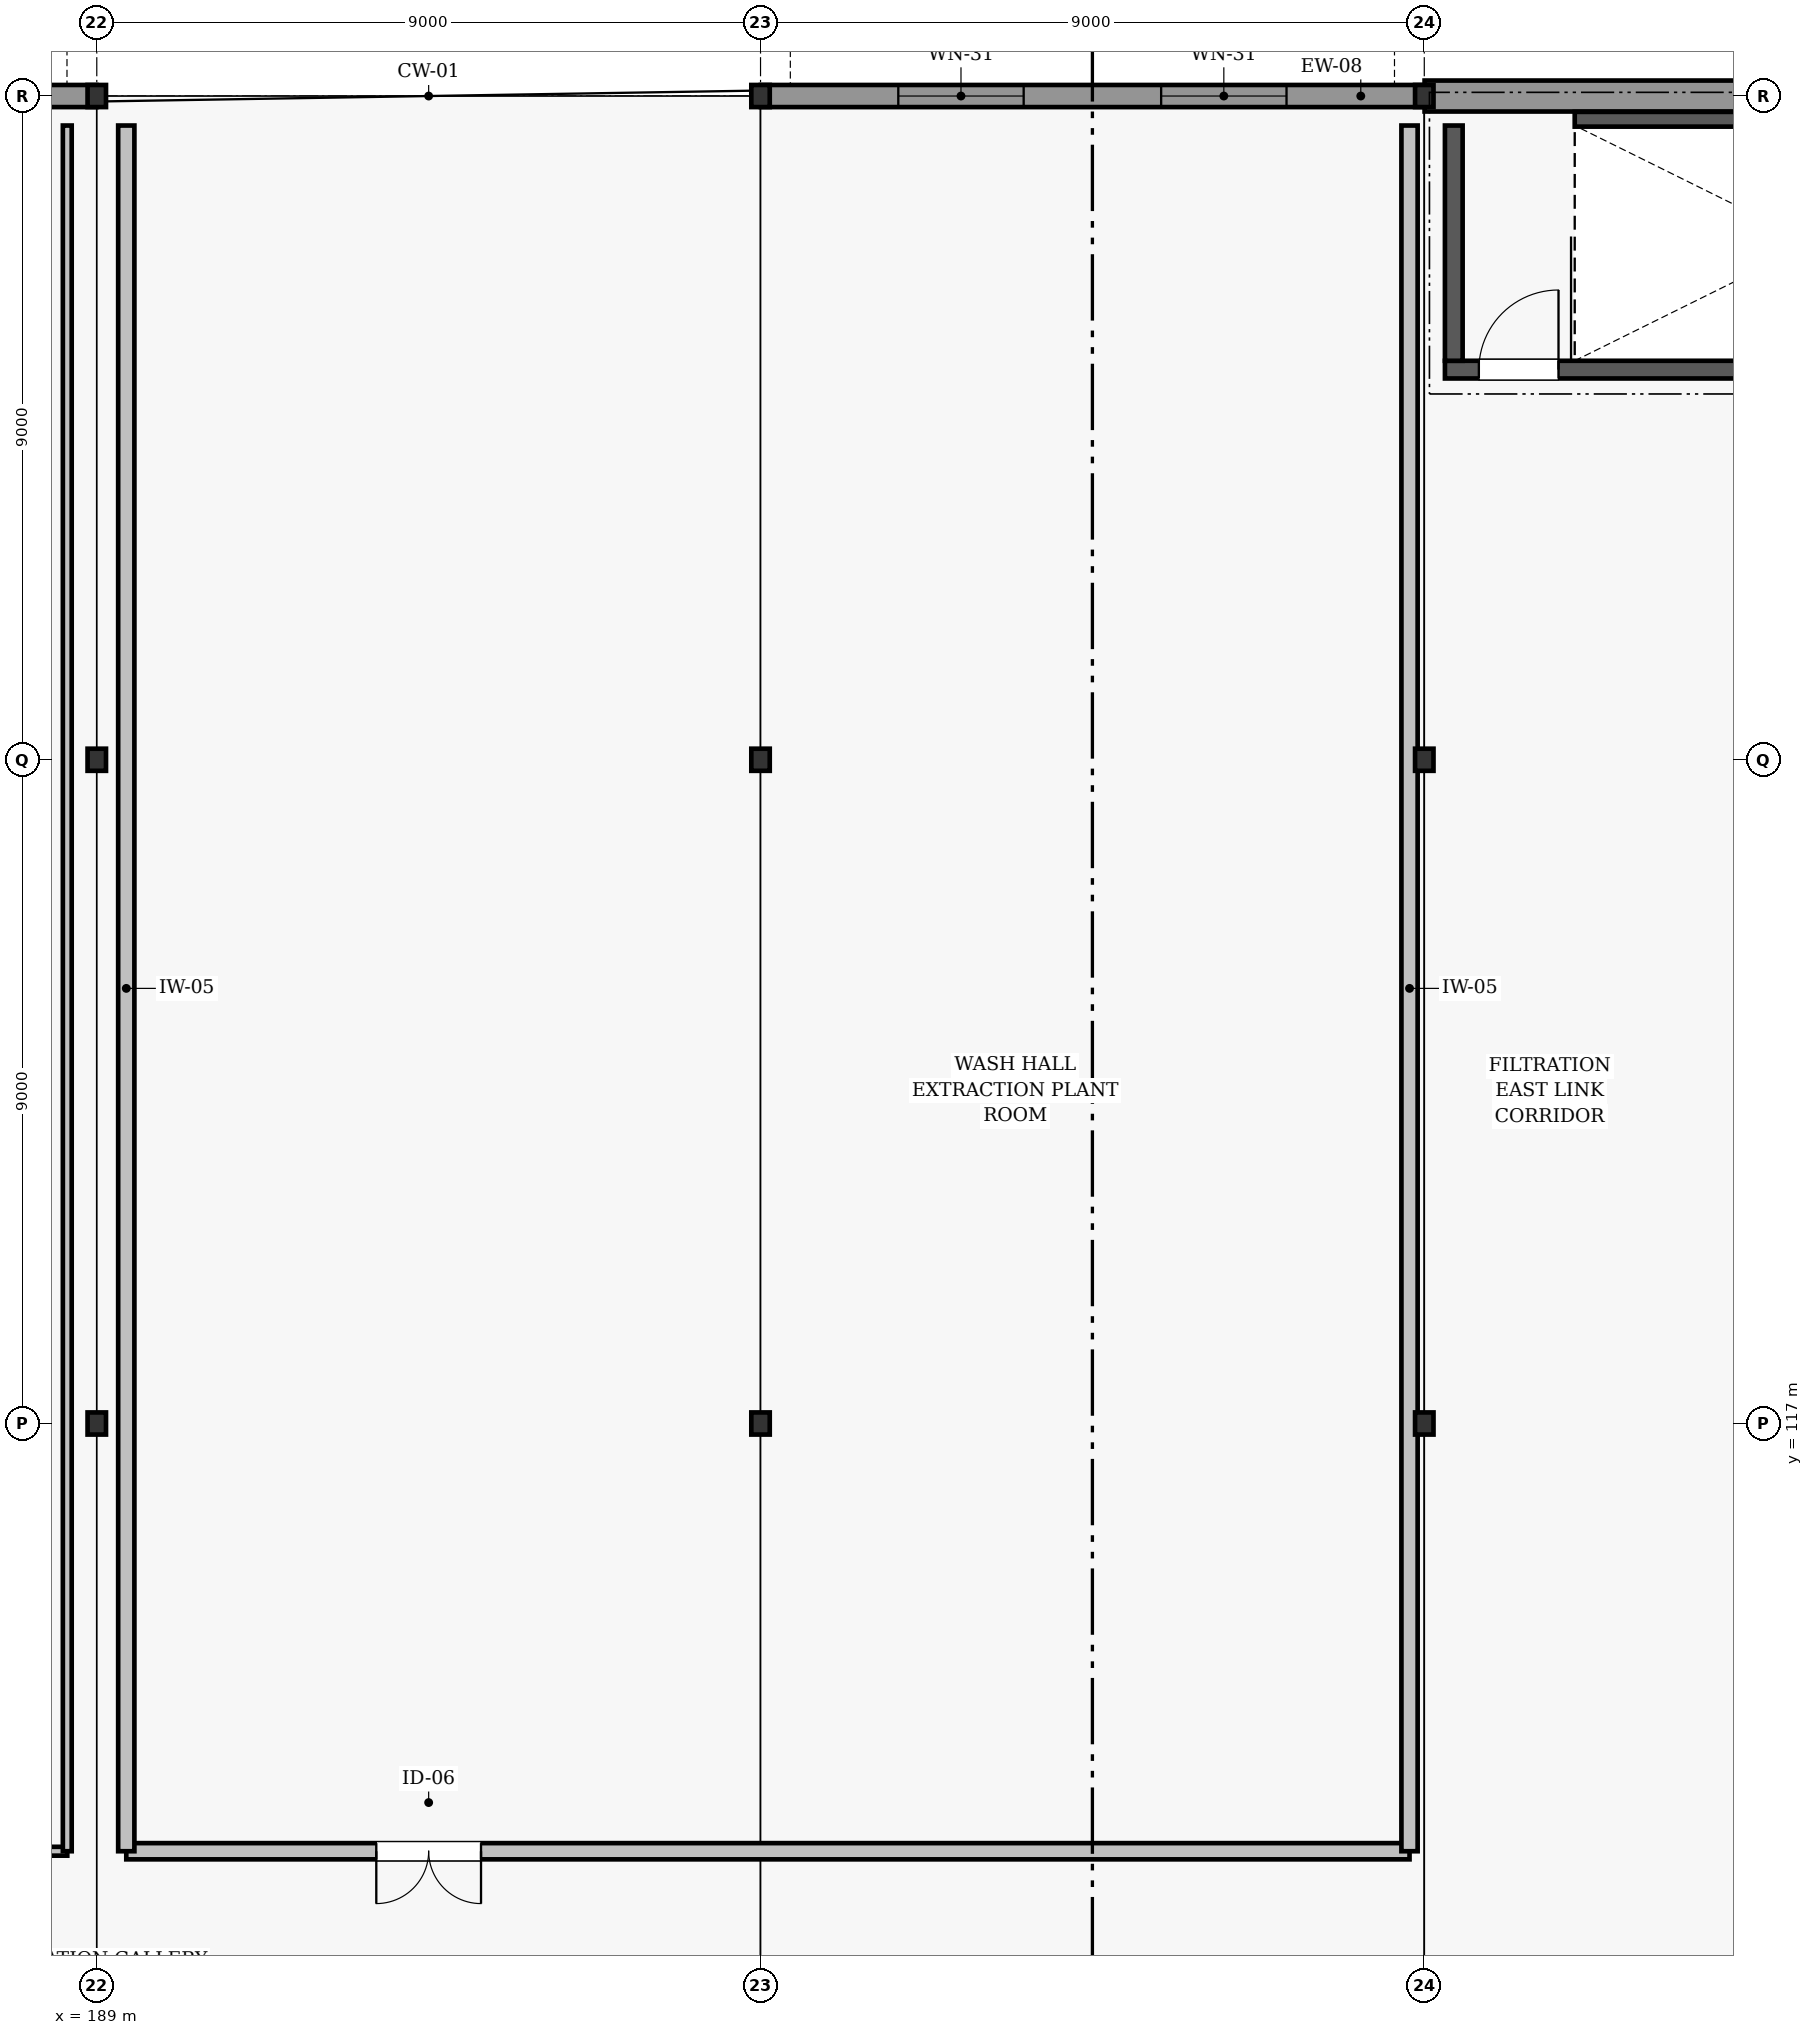
"""IFC4 building model, lengths in metres.
Left out: names, types, materials, properties, quantities, classifications, styles, units other than length and angle.
Written with IfcOpenShell. Run it as: python <this file> out.ifc"""

import sys

from ifc_helpers import new_model, si_unit, direction, frame, frame_2d, origin, origin_2d, place, context, subcontext, project, spatial, rectangle, i_section, extrude, element, fill, save


model = new_model("IFC4")
c1 = context("Model", 3, precision=1e-05, world=origin(), true_north=direction((0.0, 1.0)))
c2 = subcontext(c1, "Body", "Model", "MODEL_VIEW")
j1 = project(units=[si_unit("LENGTHUNIT", "METRE"), si_unit("PLANEANGLEUNIT", "RADIAN")], contexts=[c1])
p1 = place(None, origin())
s1 = spatial("IfcSite", under=j1, at=p1, CompositionType="ELEMENT")
p2 = place(p1, origin())
s2 = spatial("IfcBuilding", under=s1, at=p2, CompositionType="ELEMENT")
p3 = place(p2, frame((0.0, 0.0, 4.8)))
s3 = spatial("IfcBuildingStorey", under=s2, at=p3, CompositionType="ELEMENT", Elevation=4.8)
for number, where, z_axis, x_axis in (
    (1, (189.0, 117.0, 0.0), (0.0, 0.0, 1.0), (1.0, 0.0, 0.0)),
    (2, (189.0, 126.0, 0.0), (0.0, 0.0, 1.0), (1.0, 0.0, 0.0)),
    (3, (189.0, 135.0, 0.0), (0.0, 0.0, 1.0), (1.0, 0.0, 0.0)),
    (4, (198.0, 117.0, 0.0), (0.0, 0.0, 1.0), (1.0, 0.0, 0.0)),
    (5, (198.0, 126.0, 0.0), (0.0, 0.0, 1.0), (1.0, 0.0, 0.0)),
    (6, (198.0, 135.0, 0.0), (0.0, 0.0, 1.0), (1.0, 0.0, 0.0)),
    (7, (207.0, 117.0, 0.0), (0.0, 0.0, 1.0), (1.0, 0.0, 0.0)),
    (8, (207.0, 126.0, 0.0), (0.0, 0.0, 1.0), (1.0, 0.0, 0.0)),
    (9, (207.0, 135.0, 0.0), (0.0, 0.0, 1.0), (1.0, 0.0, 0.0)),
):
    element("IfcColumn", number, at=place(p3, frame(where, z_axis=z_axis, x_axis=x_axis)), inside=s3, PredefinedType="COLUMN", context=c2, shape_type="SweptSolid", body=[
        extrude(i_section(OverallWidth=0.25, OverallDepth=0.3, WebThickness=0.01, FlangeThickness=0.01, FilletRadius=0.012, at=origin_2d()), origin(), (0.0, 0.0, 1.0), 3.6),
    ])
p4 = place(p3, frame((180.004, 135.0, 0.0), z_axis=(0.0, 0.0, 1.0), x_axis=(1.0, 0.0, 0.0)))
e10 = element("IfcWall", 10, at=p4, inside=s3, PredefinedType="SOLIDWALL", context=c2, shape_type="SweptSolid", body=[
    extrude(rectangle(XDim=8.992, YDim=0.3, at=frame_2d((4.496, 0.0))), origin(), (0.0, 0.0, 1.0), 2.842),
])
p5 = place(p4, frame((1.764, 0.0, 1.55)))
e11 = element("IfcOpeningElement", 11, at=p5, cuts=e10, PredefinedType="OPENING", context=c2, shape_type="SweptSolid", body=[
    extrude(rectangle(XDim=1.85, YDim=1.04, at=frame_2d((0.925, 0.52))), frame((0.0, 0.16, 0.0), z_axis=(0.0, -1.0, 0.0), x_axis=(1.0, 0.0, 0.0)), (0.0, 0.0, 1.0), 0.32),
])
p6 = place(p4, frame((5.378, 0.0, 1.55)))
e12 = element("IfcOpeningElement", 12, at=p6, cuts=e10, PredefinedType="OPENING", context=c2, shape_type="SweptSolid", body=[
    extrude(rectangle(XDim=1.85, YDim=1.04, at=frame_2d((0.925, 0.52))), frame((0.0, 0.16, 0.0), z_axis=(0.0, -1.0, 0.0), x_axis=(1.0, 0.0, 0.0)), (0.0, 0.0, 1.0), 0.32),
])
p7 = place(p3, frame((198.004, 135.0, 0.0), z_axis=(0.0, 0.0, 1.0), x_axis=(1.0, 0.0, 0.0)))
e13 = element("IfcWall", 13, at=p7, inside=s3, PredefinedType="SOLIDWALL", context=c2, shape_type="SweptSolid", body=[
    extrude(rectangle(XDim=8.992, YDim=0.3, at=frame_2d((4.496, 0.0))), origin(), (0.0, 0.0, 1.0), 2.842),
])
p8 = place(p7, frame((1.864, 0.0, 1.55)))
e14 = element("IfcOpeningElement", 14, at=p8, cuts=e13, PredefinedType="OPENING", context=c2, shape_type="SweptSolid", body=[
    extrude(rectangle(XDim=1.7, YDim=1.0, at=frame_2d((0.85, 0.5))), frame((0.0, 0.16, 0.0), z_axis=(0.0, -1.0, 0.0), x_axis=(1.0, 0.0, 0.0)), (0.0, 0.0, 1.0), 0.32),
])
p9 = place(p7, frame((5.428, 0.0, 1.55)))
e15 = element("IfcOpeningElement", 15, at=p9, cuts=e13, PredefinedType="OPENING", context=c2, shape_type="SweptSolid", body=[
    extrude(rectangle(XDim=1.7, YDim=1.0, at=frame_2d((0.85, 0.5))), frame((0.0, 0.16, 0.0), z_axis=(0.0, -1.0, 0.0), x_axis=(1.0, 0.0, 0.0)), (0.0, 0.0, 1.0), 0.32),
])
p10 = place(p3, frame((207.004, 135.0, 0.0), z_axis=(0.0, 0.0, 1.0), x_axis=(1.0, 0.0, 0.0)))
e16 = element("IfcWall", 16, at=p10, inside=s3, PredefinedType="SOLIDWALL", context=c2, shape_type="SweptSolid", body=[
    extrude(rectangle(XDim=8.992, YDim=0.42, at=frame_2d((4.496, 0.0))), origin(), (0.0, 0.0, 1.0), 2.842),
])
p11 = place(p3, frame((207.28, 131.29, 0.0), z_axis=(0.0, 0.0, 1.0), x_axis=(1.0, 0.0, 0.0)))
e17 = element("IfcWall", 17, at=p11, inside=s3, PredefinedType="SHEAR", context=c2, shape_type="SweptSolid", body=[
    extrude(rectangle(XDim=8.44, YDim=0.24, at=frame_2d((4.22, 0.0))), origin(), (0.0, 0.0, 1.0), 3.35),
])
p12 = place(p11, frame((0.46, 0.0, 0.0)))
e18 = element("IfcOpeningElement", 18, at=p12, cuts=e17, PredefinedType="OPENING", context=c2, shape_type="SweptSolid", body=[
    extrude(rectangle(XDim=1.08, YDim=2.08, at=frame_2d((0.54, 1.04))), frame((0.0, 0.13, 0.0), z_axis=(0.0, -1.0, 0.0), x_axis=(1.0, 0.0, 0.0)), (0.0, 0.0, 1.0), 0.26),
])
p13 = place(p3, frame((209.04, 134.685, 0.0), z_axis=(0.0, 0.0, 1.0), x_axis=(1.0, 0.0, 0.0)))
e19 = element("IfcWall", 19, at=p13, inside=s3, PredefinedType="SHEAR", context=c2, shape_type="SweptSolid", body=[
    extrude(rectangle(XDim=6.44, YDim=0.2, at=frame_2d((3.22, 0.0))), origin(), (0.0, 0.0, 1.0), 3.35),
])
p14 = place(p3, frame((207.4, 131.41, 0.0), z_axis=(0.0, 0.0, 1.0), x_axis=(0.0, 1.0, 0.0)))
e20 = element("IfcWall", 20, at=p14, inside=s3, PredefinedType="SHEAR", context=c2, shape_type="SweptSolid", body=[
    extrude(rectangle(XDim=3.19, YDim=0.24, at=frame_2d((1.595, 0.0))), origin(), (0.0, 0.0, 1.0), 3.35),
])
p15 = place(p3, frame((162.4, 111.2, 0.0), z_axis=(0.0, 0.0, 1.0), x_axis=(1.0, 0.0, 0.0)))
e21 = element("IfcWall", 21, at=p15, inside=s3, PredefinedType="PARTITIONING", context=c2, shape_type="SweptSolid", body=[
    extrude(rectangle(XDim=26.2, YDim=0.12, at=frame_2d((13.1, 0.0))), origin(), (0.0, 0.0, 1.0), 2.845),
])
p16 = place(p15, frame((12.61, 0.0, 0.0)))
e22 = element("IfcOpeningElement", 22, at=p16, cuts=e21, PredefinedType="OPENING", context=c2, shape_type="SweptSolid", body=[
    extrude(rectangle(XDim=0.98, YDim=2.08, at=frame_2d((0.49, 1.04))), frame((0.0, 0.07, 0.0), z_axis=(0.0, -1.0, 0.0), x_axis=(1.0, 0.0, 0.0)), (0.0, 0.0, 1.0), 0.14),
])
p17 = place(p3, frame((188.6, 111.2, 0.0), z_axis=(0.0, 0.0, 1.0), x_axis=(0.0, 1.0, 0.0)))
e23 = element("IfcWall", 23, at=p17, inside=s3, PredefinedType="PARTITIONING", context=c2, shape_type="SweptSolid", body=[
    extrude(rectangle(XDim=23.4, YDim=0.12, at=frame_2d((11.7, 0.0))), origin(), (0.0, 0.0, 1.0), 2.845),
])
p18 = place(p3, frame((189.4, 111.2, 0.0), z_axis=(0.0, 0.0, 1.0), x_axis=(1.0, 0.0, 0.0)))
e24 = element("IfcWall", 24, at=p18, inside=s3, PredefinedType="SOLIDWALL", context=c2, shape_type="SweptSolid", body=[
    extrude(rectangle(XDim=17.4, YDim=0.22, at=frame_2d((8.7, 0.0))), origin(), (0.0, 0.0, 1.0), 2.845),
])
p19 = place(p18, frame((3.39, 0.0, 0.0)))
e25 = element("IfcOpeningElement", 25, at=p19, cuts=e24, PredefinedType="OPENING", context=c2, shape_type="SweptSolid", body=[
    extrude(rectangle(XDim=1.42, YDim=2.12, at=frame_2d((0.71, 1.06))), frame((0.0, 0.12, 0.0), z_axis=(0.0, -1.0, 0.0), x_axis=(1.0, 0.0, 0.0)), (0.0, 0.0, 1.0), 0.24),
])
for number, where, z_axis, x_axis in (
    (26, (189.4, 111.2, 0.0), (0.0, 0.0, 1.0), (0.0, 1.0, 0.0)),
    (27, (206.8, 111.2, 0.0), (0.0, 0.0, 1.0), (0.0, 1.0, 0.0)),
):
    element("IfcWall", number, at=place(p3, frame(where, z_axis=z_axis, x_axis=x_axis)), inside=s3, PredefinedType="SOLIDWALL", context=c2, shape_type="SweptSolid", body=[
        extrude(rectangle(XDim=23.4, YDim=0.22, at=frame_2d((11.7, 0.0))), origin(), (0.0, 0.0, 1.0), 2.845),
    ])
p20 = place(p8, origin())
e28 = element("IfcWindow", 28, at=p20, inside=s3, PartitioningType="SINGLE_PANEL", PredefinedType="WINDOW", context=c2, shape_type="SweptSolid", body=[
    extrude(rectangle(XDim=1.7, YDim=1.0, at=frame_2d((0.85, 0.5))), frame((0.0, 0.03, 0.0), z_axis=(0.0, -1.0, 0.0), x_axis=(1.0, 0.0, 0.0)), (0.0, 0.0, 1.0), 0.06),
])
fill(e14, e28)
p21 = place(p9, origin())
e29 = element("IfcWindow", 29, at=p21, inside=s3, PartitioningType="SINGLE_PANEL", PredefinedType="WINDOW", context=c2, shape_type="SweptSolid", body=[
    extrude(rectangle(XDim=1.7, YDim=1.0, at=frame_2d((0.85, 0.5))), frame((0.0, 0.03, 0.0), z_axis=(0.0, -1.0, 0.0), x_axis=(1.0, 0.0, 0.0)), (0.0, 0.0, 1.0), 0.06),
])
fill(e15, e29)
p22 = place(p12, origin())
e30 = element("IfcDoor", 30, at=p22, inside=s3, OperationType="SINGLE_SWING_RIGHT", PredefinedType="DOOR", context=c2, shape_type="SweptSolid", body=[
    extrude(rectangle(XDim=1.08, YDim=2.08, at=frame_2d((0.54, 1.04))), frame((0.0, 0.025, 0.0), z_axis=(0.0, -1.0, 0.0), x_axis=(1.0, 0.0, 0.0)), (0.0, 0.0, 1.0), 0.05),
])
fill(e18, e30)
p23 = place(p19, frame((1.42, 0.0, 0.0), z_axis=(0.0, 0.0, 1.0), x_axis=(-1.0, 0.0, 0.0)))
e31 = element("IfcDoor", 31, at=p23, inside=s3, OperationType="DOUBLE_SWING_LEFT", PredefinedType="DOOR", context=c2, shape_type="SweptSolid", body=[
    extrude(rectangle(XDim=1.42, YDim=2.12, at=frame_2d((0.71, 1.06))), frame((0.0, 0.025, 0.0), z_axis=(0.0, -1.0, 0.0), x_axis=(1.0, 0.0, 0.0)), (0.0, 0.0, 1.0), 0.05),
])
fill(e25, e31)
save(model, sys.argv[1])
